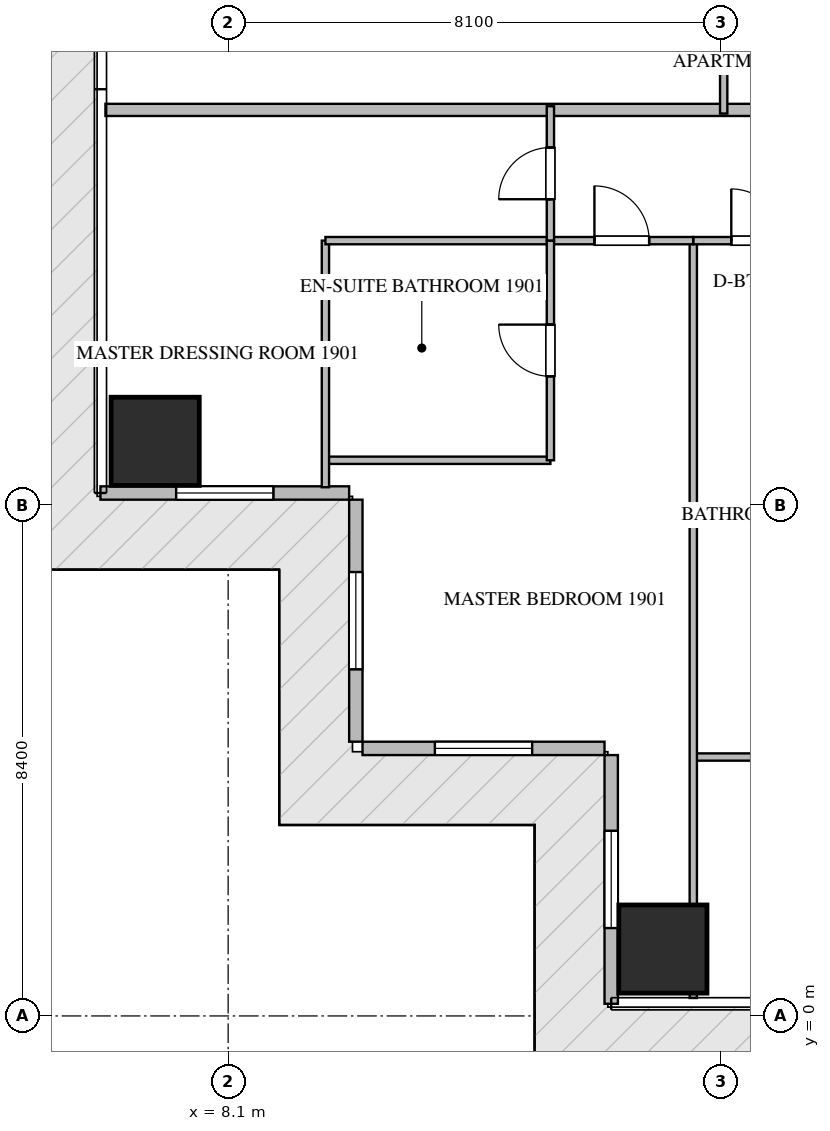
"""IFC4 building model, lengths in metres.
Left out: names, types, materials, properties, quantities, classifications, styles, units other than length and angle.
Written with IfcOpenShell. Run it as: python <this file> out.ifc"""

import sys

from ifc_helpers import new_model, si_unit, direction, frame, frame_2d, origin, origin_2d, place, context, subcontext, project, spatial, rectangle, extrude, source, transform, mapped, element, fill, save


model = new_model("IFC4")
c1 = context("Model", 3, precision=1e-05, world=origin(), true_north=direction((0.0, 1.0)))
c2 = subcontext(c1, "Body", "Model", "MODEL_VIEW")
j1 = project(units=[si_unit("LENGTHUNIT", "METRE"), si_unit("PLANEANGLEUNIT", "RADIAN")], contexts=[c1])
p1 = place(None, origin())
s1 = spatial("IfcSite", under=j1, at=p1, CompositionType="ELEMENT")
p2 = place(p1, origin())
s2 = spatial("IfcBuilding", under=s1, at=p2, CompositionType="ELEMENT")
p3 = place(p2, frame((0.0, 0.0, 79.2)))
s3 = spatial("IfcBuildingStorey", under=s2, at=p3, CompositionType="ELEMENT", Elevation=79.2)
m1 = source(origin(), c2, "Body", "SweptSolid", [
    extrude(rectangle(XDim=1.45, YDim=1.45, at=origin_2d()), origin(), (0.0, 0.0, 1.0), 3.75),
])
for number, where, z_axis, x_axis in (
    (1, (15.25, 1.1, -0.26), (0.0, 0.0, 1.0), (1.0, 0.0, 0.0)),
    (2, (6.9, 9.45, -0.26), (0.0, 0.0, 1.0), (1.0, 0.0, 0.0)),
):
    element("IfcColumn", number, at=place(p3, frame(where, z_axis=z_axis, x_axis=x_axis)), inside=s3, PredefinedType="COLUMN", context=c2, shape_type="MappedRepresentation", body=[
        mapped(m1, transform((0.0, 0.0, 0.0), scale=1.0)),
    ])
p4 = place(p3, frame((6.0, 8.6, 0.0), z_axis=(0.0, 0.0, 1.0), x_axis=(1.0, 0.0, 0.0)))
e3 = element("IfcWall", 3, at=p4, inside=s3, PredefinedType="ELEMENTEDWALL", context=c2, shape_type="SweptSolid", body=[
    extrude(rectangle(XDim=4.09, YDim=0.22, at=frame_2d((2.045, 0.0))), origin(), (0.0, 0.0, 1.0), 3.475),
])
p5 = place(p4, frame((1.245, 0.0, 0.65)))
e4 = element("IfcOpeningElement", 4, at=p5, cuts=e3, PredefinedType="OPENING", context=c2, shape_type="SweptSolid", body=[
    extrude(rectangle(XDim=1.6, YDim=2.1, at=frame_2d((0.8, 1.05))), frame((0.0, 0.12, 0.0), z_axis=(0.0, -1.0, 0.0), x_axis=(1.0, 0.0, 0.0)), (0.0, 0.0, 1.0), 0.24),
])
p6 = place(p3, frame((10.2, 8.49, 0.0), z_axis=(0.0, 0.0, 1.0), x_axis=(0.0, -1.0, 0.0)))
e5 = element("IfcWall", 5, at=p6, inside=s3, PredefinedType="ELEMENTEDWALL", context=c2, shape_type="SweptSolid", body=[
    extrude(rectangle(XDim=3.98, YDim=0.22, at=frame_2d((1.99, 0.0))), origin(), (0.0, 0.0, 1.0), 3.475),
])
p7 = place(p6, frame((1.19, 0.0, 0.65)))
e6 = element("IfcOpeningElement", 6, at=p7, cuts=e5, PredefinedType="OPENING", context=c2, shape_type="SweptSolid", body=[
    extrude(rectangle(XDim=1.6, YDim=2.1, at=frame_2d((0.8, 1.05))), frame((0.0, 0.12, 0.0), z_axis=(0.0, -1.0, 0.0), x_axis=(1.0, 0.0, 0.0)), (0.0, 0.0, 1.0), 0.24),
])
p8 = place(p3, frame((10.31, 4.4, 0.0), z_axis=(0.0, 0.0, 1.0), x_axis=(1.0, 0.0, 0.0)))
e7 = element("IfcWall", 7, at=p8, inside=s3, PredefinedType="ELEMENTEDWALL", context=c2, shape_type="SweptSolid", body=[
    extrude(rectangle(XDim=3.98, YDim=0.22, at=frame_2d((1.99, 0.0))), origin(), (0.0, 0.0, 1.0), 3.475),
])
p9 = place(p8, frame((1.19, 0.0, 0.65)))
e8 = element("IfcOpeningElement", 8, at=p9, cuts=e7, PredefinedType="OPENING", context=c2, shape_type="SweptSolid", body=[
    extrude(rectangle(XDim=1.6, YDim=2.1, at=frame_2d((0.8, 1.05))), frame((0.0, 0.12, 0.0), z_axis=(0.0, -1.0, 0.0), x_axis=(1.0, 0.0, 0.0)), (0.0, 0.0, 1.0), 0.24),
])
p10 = place(p3, frame((14.4, 4.29, 0.0), z_axis=(0.0, 0.0, 1.0), x_axis=(0.0, -1.0, 0.0)))
e9 = element("IfcWall", 9, at=p10, inside=s3, PredefinedType="ELEMENTEDWALL", context=c2, shape_type="SweptSolid", body=[
    extrude(rectangle(XDim=4.09, YDim=0.22, at=frame_2d((2.045, 0.0))), origin(), (0.0, 0.0, 1.0), 3.475),
])
p11 = place(p10, frame((1.245, 0.0, 0.65)))
e10 = element("IfcOpeningElement", 10, at=p11, cuts=e9, PredefinedType="OPENING", context=c2, shape_type="SweptSolid", body=[
    extrude(rectangle(XDim=1.6, YDim=2.1, at=frame_2d((0.8, 1.05))), frame((0.0, 0.12, 0.0), z_axis=(0.0, -1.0, 0.0), x_axis=(1.0, 0.0, 0.0)), (0.0, 0.0, 1.0), 0.24),
])
p12 = place(p3, frame((6.082, 14.9, 0.0), z_axis=(0.0, 0.0, 1.0), x_axis=(1.0, 0.0, 0.0)))
e11 = element("IfcWall", 11, at=p12, inside=s3, PredefinedType="PARTITIONING", context=c2, shape_type="SweptSolid", body=[
    extrude(rectangle(XDim=15.318, YDim=0.2, at=frame_2d((7.659, 0.0))), origin(), (0.0, 0.0, 1.0), 3.49),
])
p13 = place(p3, frame((15.75, 4.258, 0.0), z_axis=(0.0, 0.0, 1.0), x_axis=(1.0, 0.0, 0.0)))
e12 = element("IfcWall", 12, at=p13, inside=s3, PredefinedType="PARTITIONING", context=c2, shape_type="SweptSolid", body=[
    extrude(rectangle(XDim=5.15, YDim=0.12, at=frame_2d((2.575, 0.0))), origin(), (0.0, 0.0, 1.0), 3.49),
])
p14 = place(p3, frame((15.75, 0.295, 0.0), z_axis=(0.0, 0.0, 1.0), x_axis=(0.0, 1.0, 0.0)))
e13 = element("IfcWall", 13, at=p14, inside=s3, PredefinedType="PARTITIONING", context=c2, shape_type="SweptSolid", body=[
    extrude(rectangle(XDim=12.455, YDim=0.12, at=frame_2d((6.228, 0.0))), origin(), (0.0, 0.0, 1.0), 3.49),
])
p15 = place(p3, frame((15.75, 12.75, 0.0), z_axis=(0.0, 0.0, 1.0), x_axis=(1.0, 0.0, 0.0)))
e14 = element("IfcWall", 14, at=p15, inside=s3, PredefinedType="PARTITIONING", context=c2, shape_type="SweptSolid", body=[
    extrude(rectangle(XDim=2.1, YDim=0.12, at=frame_2d((1.05, 0.0))), origin(), (0.0, 0.0, 1.0), 3.49),
])
p16 = place(p15, frame((0.625, 0.0, 0.0)))
e15 = element("IfcOpeningElement", 15, at=p16, cuts=e14, PredefinedType="OPENING", context=c2, shape_type="SweptSolid", body=[
    extrude(rectangle(XDim=0.85, YDim=2.1, at=frame_2d((0.425, 1.05))), frame((0.0, 0.07, 0.0), z_axis=(0.0, -1.0, 0.0), x_axis=(1.0, 0.0, 0.0)), (0.0, 0.0, 1.0), 0.14),
])
p17 = place(p3, frame((13.4, 12.75, 0.0), z_axis=(0.0, 0.0, 1.0), x_axis=(1.0, 0.0, 0.0)))
e16 = element("IfcWall", 16, at=p17, inside=s3, PredefinedType="PARTITIONING", context=c2, shape_type="SweptSolid", body=[
    extrude(rectangle(XDim=2.348, YDim=0.12, at=frame_2d((1.174, 0.0))), origin(), (0.0, 0.0, 1.0), 3.49),
])
p18 = place(p17, frame((0.724, 0.0, 0.0)))
e17 = element("IfcOpeningElement", 17, at=p18, cuts=e16, PredefinedType="OPENING", context=c2, shape_type="SweptSolid", body=[
    extrude(rectangle(XDim=0.9, YDim=2.1, at=frame_2d((0.45, 1.05))), frame((0.0, 0.07, 0.0), z_axis=(0.0, -1.0, 0.0), x_axis=(1.0, 0.0, 0.0)), (0.0, 0.0, 1.0), 0.14),
])
p19 = place(p3, frame((9.7, 9.138, 0.0), z_axis=(0.0, 0.0, 1.0), x_axis=(1.0, 0.0, 0.0)))
e18 = element("IfcWall", 18, at=p19, inside=s3, PredefinedType="PARTITIONING", context=c2, shape_type="SweptSolid", body=[
    extrude(rectangle(XDim=3.7, YDim=0.12, at=frame_2d((1.85, 0.0))), origin(), (0.0, 0.0, 1.0), 3.49),
])
p20 = place(p3, frame((9.7, 8.695, 0.0), z_axis=(0.0, 0.0, 1.0), x_axis=(0.0, 1.0, 0.0)))
e19 = element("IfcWall", 19, at=p20, inside=s3, PredefinedType="PARTITIONING", context=c2, shape_type="SweptSolid", body=[
    extrude(rectangle(XDim=4.055, YDim=0.12, at=frame_2d((2.027, 0.0))), origin(), (0.0, 0.0, 1.0), 3.49),
])
p21 = place(p3, frame((9.7, 12.75, 0.0), z_axis=(0.0, 0.0, 1.0), x_axis=(1.0, 0.0, 0.0)))
e20 = element("IfcWall", 20, at=p21, inside=s3, PredefinedType="PARTITIONING", context=c2, shape_type="SweptSolid", body=[
    extrude(rectangle(XDim=3.698, YDim=0.12, at=frame_2d((1.849, 0.0))), origin(), (0.0, 0.0, 1.0), 3.49),
])
p22 = place(p3, frame((13.4, 9.138, 0.0), z_axis=(0.0, 0.0, 1.0), x_axis=(0.0, 1.0, 0.0)))
e21 = element("IfcWall", 21, at=p22, inside=s3, PredefinedType="PARTITIONING", context=c2, shape_type="SweptSolid", body=[
    extrude(rectangle(XDim=3.612, YDim=0.12, at=frame_2d((1.806, 0.0))), origin(), (0.0, 0.0, 1.0), 3.49),
])
p23 = place(p22, frame((1.381, 0.0, 0.0)))
e22 = element("IfcOpeningElement", 22, at=p23, cuts=e21, PredefinedType="OPENING", context=c2, shape_type="SweptSolid", body=[
    extrude(rectangle(XDim=0.85, YDim=2.1, at=frame_2d((0.425, 1.05))), frame((0.0, 0.07, 0.0), z_axis=(0.0, -1.0, 0.0), x_axis=(1.0, 0.0, 0.0)), (0.0, 0.0, 1.0), 0.14),
])
p24 = place(p3, frame((13.4, 12.752, 0.0), z_axis=(0.0, 0.0, 1.0), x_axis=(0.0, 1.0, 0.0)))
e23 = element("IfcWall", 23, at=p24, inside=s3, PredefinedType="PARTITIONING", context=c2, shape_type="SweptSolid", body=[
    extrude(rectangle(XDim=2.208, YDim=0.12, at=frame_2d((1.104, 0.0))), origin(), (0.0, 0.0, 1.0), 3.49),
])
p25 = place(p24, frame((0.679, 0.0, 0.0)))
e24 = element("IfcOpeningElement", 24, at=p25, cuts=e23, PredefinedType="OPENING", context=c2, shape_type="SweptSolid", body=[
    extrude(rectangle(XDim=0.85, YDim=2.1, at=frame_2d((0.425, 1.05))), frame((0.0, 0.07, 0.0), z_axis=(0.0, -1.0, 0.0), x_axis=(1.0, 0.0, 0.0)), (0.0, 0.0, 1.0), 0.14),
])
p26 = place(p3, frame((16.25, 14.84, 0.0), z_axis=(0.0, 0.0, 1.0), x_axis=(0.0, 1.0, 0.0)))
e25 = element("IfcWall", 25, at=p26, inside=s3, PredefinedType="PARTITIONING", context=c2, shape_type="SweptSolid", body=[
    extrude(rectangle(XDim=2.48, YDim=0.12, at=frame_2d((1.24, 0.0))), origin(), (0.0, 0.0, 1.0), 3.49),
])
m2 = source(origin(), c2, "Body", "SweptSolid", [
    extrude(rectangle(XDim=1.6, YDim=2.1, at=frame_2d((0.8, 1.05))), frame((0.0, 0.03, 0.0), z_axis=(0.0, -1.0, 0.0), x_axis=(1.0, 0.0, 0.0)), (0.0, 0.0, 1.0), 0.06),
])
p27 = place(p5, origin())
e26 = element("IfcWindow", 26, at=p27, inside=s3, PartitioningType="SINGLE_PANEL", PredefinedType="WINDOW", context=c2, shape_type="MappedRepresentation", body=[
    mapped(m2, transform((0.0, 0.0, 0.0), scale=1.0)),
])
fill(e4, e26)
p28 = place(p7, origin())
e27 = element("IfcWindow", 27, at=p28, inside=s3, PartitioningType="SINGLE_PANEL", PredefinedType="WINDOW", context=c2, shape_type="MappedRepresentation", body=[
    mapped(m2, transform((0.0, 0.0, 0.0), scale=1.0)),
])
fill(e6, e27)
p29 = place(p9, origin())
e28 = element("IfcWindow", 28, at=p29, inside=s3, PartitioningType="SINGLE_PANEL", PredefinedType="WINDOW", context=c2, shape_type="MappedRepresentation", body=[
    mapped(m2, transform((0.0, 0.0, 0.0), scale=1.0)),
])
fill(e8, e28)
p30 = place(p11, origin())
e29 = element("IfcWindow", 29, at=p30, inside=s3, PartitioningType="SINGLE_PANEL", PredefinedType="WINDOW", context=c2, shape_type="MappedRepresentation", body=[
    mapped(m2, transform((0.0, 0.0, 0.0), scale=1.0)),
])
fill(e10, e29)
m3 = source(origin(), c2, "Body", "SweptSolid", [
    extrude(rectangle(XDim=0.85, YDim=2.1, at=frame_2d((0.425, 1.05))), frame((0.0, 0.025, 0.0), z_axis=(0.0, -1.0, 0.0), x_axis=(1.0, 0.0, 0.0)), (0.0, 0.0, 1.0), 0.05),
])
p31 = place(p16, origin())
e30 = element("IfcDoor", 30, at=p31, inside=s3, OperationType="SINGLE_SWING_LEFT", PredefinedType="DOOR", context=c2, shape_type="MappedRepresentation", body=[
    mapped(m3, transform((0.0, 0.0, 0.0), scale=1.0)),
])
fill(e15, e30)
m4 = source(origin(), c2, "Body", "SweptSolid", [
    extrude(rectangle(XDim=0.9, YDim=2.1, at=frame_2d((0.45, 1.05))), frame((0.0, 0.025, 0.0), z_axis=(0.0, -1.0, 0.0), x_axis=(1.0, 0.0, 0.0)), (0.0, 0.0, 1.0), 0.05),
])
p32 = place(p18, origin())
e31 = element("IfcDoor", 31, at=p32, inside=s3, OperationType="SINGLE_SWING_LEFT", PredefinedType="DOOR", context=c2, shape_type="MappedRepresentation", body=[
    mapped(m4, transform((0.0, 0.0, 0.0), scale=1.0)),
])
fill(e17, e31)
p33 = place(p23, origin())
e32 = element("IfcDoor", 32, at=p33, inside=s3, OperationType="SINGLE_SWING_RIGHT", PredefinedType="DOOR", context=c2, shape_type="MappedRepresentation", body=[
    mapped(m3, transform((0.0, 0.0, 0.0), scale=1.0)),
])
fill(e22, e32)
p34 = place(p25, origin())
e33 = element("IfcDoor", 33, at=p34, inside=s3, OperationType="SINGLE_SWING_LEFT", PredefinedType="DOOR", context=c2, shape_type="MappedRepresentation", body=[
    mapped(m3, transform((0.0, 0.0, 0.0), scale=1.0)),
])
fill(e24, e33)
save(model, sys.argv[1])
